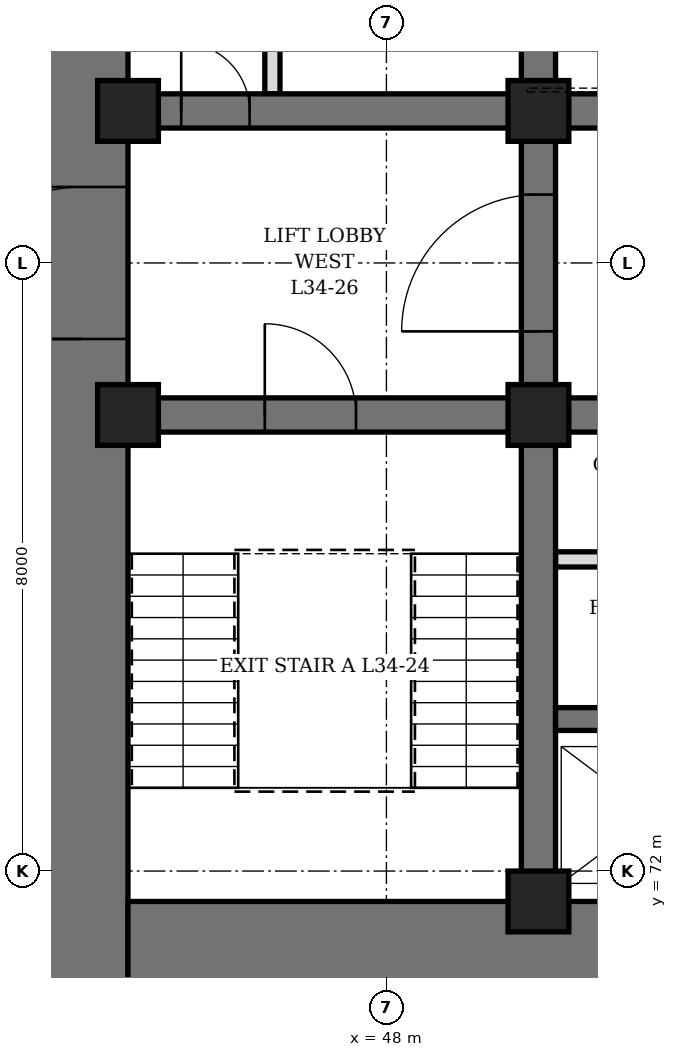
"""IFC4 building model, lengths in metres.
Left out: names, types, materials, properties, quantities, classifications, styles, units other than length and angle.
Written with IfcOpenShell. Run it as: python <this file> out.ifc"""

import sys

from ifc_helpers import new_model, si_unit, direction, frame, frame_2d, origin, origin_2d, place, context, subcontext, project, spatial, rectangle, hollow_rectangle, extrude, element, fill, save


model = new_model("IFC4")
c1 = context("Model", 3, precision=1e-05, world=origin(), true_north=direction((0.0, 1.0)))
c2 = subcontext(c1, "Body", "Model", "MODEL_VIEW")
j1 = project(units=[si_unit("LENGTHUNIT", "METRE"), si_unit("PLANEANGLEUNIT", "RADIAN")], contexts=[c1])
p1 = place(None, origin())
s1 = spatial("IfcSite", under=j1, at=p1, CompositionType="ELEMENT")
p2 = place(p1, origin())
s2 = spatial("IfcBuilding", under=s1, at=p2, CompositionType="ELEMENT")
p3 = place(p2, frame((0.0, 0.0, 154.3)))
s3 = spatial("IfcBuildingStorey", under=s2, at=p3, CompositionType="ELEMENT", Elevation=154.3)
p4 = place(p3, frame((44.0, 70.4, 0.0), z_axis=(0.0, 0.0, 1.0), x_axis=(0.0, 1.0, 0.0)))
e1 = element("IfcWall", 1, at=p4, inside=s3, PredefinedType="SHEAR", context=c2, shape_type="SweptSolid", body=[
    extrude(rectangle(XDim=19.2, YDim=1.2, at=frame_2d((9.6, 0.0))), origin(), (0.0, 0.0, 1.0), 4.2),
])
p5 = place(p4, frame((8.6, 0.0, 0.0)))
e2 = element("IfcOpeningElement", 2, at=p5, cuts=e1, PredefinedType="OPENING", context=c2, shape_type="SweptSolid", body=[
    extrude(rectangle(XDim=2.0, YDim=2.4, at=frame_2d((1.0, 1.2))), frame((0.0, 0.61, 0.0), z_axis=(0.0, -1.0, 0.0), x_axis=(1.0, 0.0, 0.0)), (0.0, 0.0, 1.0), 1.22),
])
p6 = place(p3, frame((44.6, 71.0, 0.0), z_axis=(0.0, 0.0, 1.0), x_axis=(1.0, 0.0, 0.0)))
e3 = element("IfcWall", 3, at=p6, inside=s3, PredefinedType="SHEAR", context=c2, shape_type="SweptSolid", body=[
    extrude(rectangle(XDim=22.8, YDim=1.2, at=frame_2d((11.4, 0.0))), origin(), (0.0, 0.0, 1.0), 4.2),
])
p7 = place(p3, frame((50.0, 71.6, 0.0), z_axis=(0.0, 0.0, 1.0), x_axis=(0.0, 1.0, 0.0)))
e4 = element("IfcWall", 4, at=p7, inside=s3, PredefinedType="SHEAR", context=c2, shape_type="SweptSolid", body=[
    extrude(rectangle(XDim=16.8, YDim=0.45, at=frame_2d((8.4, 0.0))), origin(), (0.0, 0.0, 1.0), 4.2),
])
p8 = place(p7, frame((7.5, 0.0, 0.0)))
e5 = element("IfcOpeningElement", 5, at=p8, cuts=e4, PredefinedType="OPENING", context=c2, shape_type="SweptSolid", body=[
    extrude(rectangle(XDim=1.8, YDim=2.4, at=frame_2d((0.9, 1.2))), frame((0.0, 0.235, 0.0), z_axis=(0.0, -1.0, 0.0), x_axis=(1.0, 0.0, 0.0)), (0.0, 0.0, 1.0), 0.47),
])
p9 = place(p3, frame((44.6, 78.0, 0.0), z_axis=(0.0, 0.0, 1.0), x_axis=(1.0, 0.0, 0.0)))
e6 = element("IfcWall", 6, at=p9, inside=s3, PredefinedType="SHEAR", context=c2, shape_type="SweptSolid", body=[
    extrude(rectangle(XDim=5.175, YDim=0.45, at=frame_2d((2.587, 0.0))), origin(), (0.0, 0.0, 1.0), 4.2),
])
p10 = place(p9, frame((1.8, 0.0, 0.0)))
e7 = element("IfcOpeningElement", 7, at=p10, cuts=e6, PredefinedType="OPENING", context=c2, shape_type="SweptSolid", body=[
    extrude(rectangle(XDim=1.2, YDim=2.1, at=frame_2d((0.6, 1.05))), frame((0.0, 0.235, 0.0), z_axis=(0.0, -1.0, 0.0), x_axis=(1.0, 0.0, 0.0)), (0.0, 0.0, 1.0), 0.47),
])
p11 = place(p3, frame((44.6, 82.0, 0.0), z_axis=(0.0, 0.0, 1.0), x_axis=(1.0, 0.0, 0.0)))
e8 = element("IfcWall", 8, at=p11, inside=s3, PredefinedType="SHEAR", context=c2, shape_type="SweptSolid", body=[
    extrude(rectangle(XDim=5.175, YDim=0.45, at=frame_2d((2.587, 0.0))), origin(), (0.0, 0.0, 1.0), 4.2),
])
p12 = place(p11, frame((0.7, 0.0, 0.0)))
e9 = element("IfcOpeningElement", 9, at=p12, cuts=e8, PredefinedType="OPENING", context=c2, shape_type="SweptSolid", body=[
    extrude(rectangle(XDim=0.9, YDim=2.1, at=frame_2d((0.45, 1.05))), frame((0.0, 0.235, 0.0), z_axis=(0.0, -1.0, 0.0), x_axis=(1.0, 0.0, 0.0)), (0.0, 0.0, 1.0), 0.47),
])
p13 = place(p3, frame((50.225, 78.0, 0.0), z_axis=(0.0, 0.0, 1.0), x_axis=(1.0, 0.0, 0.0)))
e10 = element("IfcWall", 10, at=p13, inside=s3, PredefinedType="SHEAR", context=c2, shape_type="SweptSolid", body=[
    extrude(rectangle(XDim=11.55, YDim=0.45, at=frame_2d((5.775, 0.0))), origin(), (0.0, 0.0, 1.0), 4.2),
])
p14 = place(p13, frame((0.825, 0.0, 0.0)))
e11 = element("IfcOpeningElement", 11, at=p14, cuts=e10, PredefinedType="OPENING", context=c2, shape_type="SweptSolid", body=[
    extrude(rectangle(XDim=0.9, YDim=2.1, at=frame_2d((0.45, 1.05))), frame((0.0, 0.235, 0.0), z_axis=(0.0, -1.0, 0.0), x_axis=(1.0, 0.0, 0.0)), (0.0, 0.0, 1.0), 0.47),
])
p15 = place(p13, frame((3.825, 0.0, 0.0)))
e12 = element("IfcOpeningElement", 12, at=p15, cuts=e10, PredefinedType="OPENING", context=c2, shape_type="SweptSolid", body=[
    extrude(rectangle(XDim=0.9, YDim=2.1, at=frame_2d((0.45, 1.05))), frame((0.0, 0.235, 0.0), z_axis=(0.0, -1.0, 0.0), x_axis=(1.0, 0.0, 0.0)), (0.0, 0.0, 1.0), 0.47),
])
p16 = place(p13, frame((6.825, 0.0, 0.0)))
e13 = element("IfcOpeningElement", 13, at=p16, cuts=e10, PredefinedType="OPENING", context=c2, shape_type="SweptSolid", body=[
    extrude(rectangle(XDim=0.9, YDim=2.1, at=frame_2d((0.45, 1.05))), frame((0.0, 0.235, 0.0), z_axis=(0.0, -1.0, 0.0), x_axis=(1.0, 0.0, 0.0)), (0.0, 0.0, 1.0), 0.47),
])
p17 = place(p13, frame((9.825, 0.0, 0.0)))
e14 = element("IfcOpeningElement", 14, at=p17, cuts=e10, PredefinedType="OPENING", context=c2, shape_type="SweptSolid", body=[
    extrude(rectangle(XDim=0.9, YDim=2.1, at=frame_2d((0.45, 1.05))), frame((0.0, 0.235, 0.0), z_axis=(0.0, -1.0, 0.0), x_axis=(1.0, 0.0, 0.0)), (0.0, 0.0, 1.0), 0.47),
])
p18 = place(p3, frame((50.225, 82.0, 0.0), z_axis=(0.0, 0.0, 1.0), x_axis=(1.0, 0.0, 0.0)))
e15 = element("IfcWall", 15, at=p18, inside=s3, PredefinedType="SHEAR", context=c2, shape_type="SweptSolid", body=[
    extrude(rectangle(XDim=11.55, YDim=0.45, at=frame_2d((5.775, 0.0))), origin(), (0.0, 0.0, 1.0), 4.2),
])
p19 = place(p18, frame((0.725, 0.0, 0.0)))
e16 = element("IfcOpeningElement", 16, at=p19, cuts=e15, PredefinedType="OPENING", context=c2, shape_type="SweptSolid", body=[
    extrude(rectangle(XDim=1.1, YDim=2.2, at=frame_2d((0.55, 1.1))), frame((0.0, 0.235, 0.0), z_axis=(0.0, -1.0, 0.0), x_axis=(1.0, 0.0, 0.0)), (0.0, 0.0, 1.0), 0.47),
])
p20 = place(p18, frame((3.725, 0.0, 0.0)))
e17 = element("IfcOpeningElement", 17, at=p20, cuts=e15, PredefinedType="OPENING", context=c2, shape_type="SweptSolid", body=[
    extrude(rectangle(XDim=1.1, YDim=2.2, at=frame_2d((0.55, 1.1))), frame((0.0, 0.235, 0.0), z_axis=(0.0, -1.0, 0.0), x_axis=(1.0, 0.0, 0.0)), (0.0, 0.0, 1.0), 0.47),
])
p21 = place(p18, frame((6.725, 0.0, 0.0)))
e18 = element("IfcOpeningElement", 18, at=p21, cuts=e15, PredefinedType="OPENING", context=c2, shape_type="SweptSolid", body=[
    extrude(rectangle(XDim=1.1, YDim=2.2, at=frame_2d((0.55, 1.1))), frame((0.0, 0.235, 0.0), z_axis=(0.0, -1.0, 0.0), x_axis=(1.0, 0.0, 0.0)), (0.0, 0.0, 1.0), 0.47),
])
p22 = place(p18, frame((9.725, 0.0, 0.0)))
e19 = element("IfcOpeningElement", 19, at=p22, cuts=e15, PredefinedType="OPENING", context=c2, shape_type="SweptSolid", body=[
    extrude(rectangle(XDim=1.1, YDim=2.2, at=frame_2d((0.55, 1.1))), frame((0.0, 0.235, 0.0), z_axis=(0.0, -1.0, 0.0), x_axis=(1.0, 0.0, 0.0)), (0.0, 0.0, 1.0), 0.47),
])
p23 = place(p3, frame((50.225, 74.0, 0.0), z_axis=(0.0, 0.0, 1.0), x_axis=(1.0, 0.0, 0.0)))
e20 = element("IfcWall", 20, at=p23, inside=s3, PredefinedType="SHEAR", context=c2, shape_type="SweptSolid", body=[
    extrude(rectangle(XDim=11.55, YDim=0.3, at=frame_2d((5.775, 0.0))), origin(), (0.0, 0.0, 1.0), 4.2),
])
for number, where, z_axis, x_axis in (
    (21, (44.6, 78.0, 0.0), (0.0, 0.0, 1.0), (1.0, 0.0, 0.0)),
    (22, (44.6, 82.0, 0.0), (0.0, 0.0, 1.0), (1.0, 0.0, 0.0)),
    (23, (50.0, 71.6, 0.0), (0.0, 0.0, 1.0), (1.0, 0.0, 0.0)),
    (24, (50.0, 78.0, 0.0), (0.0, 0.0, 1.0), (1.0, 0.0, 0.0)),
    (25, (50.0, 82.0, 0.0), (0.0, 0.0, 1.0), (1.0, 0.0, 0.0)),
):
    element("IfcColumn", number, at=place(p3, frame(where, z_axis=z_axis, x_axis=x_axis)), inside=s3, PredefinedType="COLUMN", context=c2, shape_type="SweptSolid", body=[
        extrude(hollow_rectangle(XDim=0.8, YDim=0.8, WallThickness=0.1, at=origin_2d()), origin(), (0.0, 0.0, 1.0), 4.2),
    ])
p24 = place(p3, frame((46.5, 82.225, 0.0), z_axis=(0.0, 0.0, 1.0), x_axis=(0.0, 1.0, 0.0)))
e26 = element("IfcWall", 26, at=p24, inside=s3, PredefinedType="PARTITIONING", context=c2, shape_type="SweptSolid", body=[
    extrude(rectangle(XDim=3.05, YDim=0.2, at=frame_2d((1.525, 0.0))), origin(), (0.0, 0.0, 1.0), 4.04),
])
p25 = place(p24, frame((1.075, 0.0, 0.0)))
e27 = element("IfcOpeningElement", 27, at=p25, cuts=e26, PredefinedType="OPENING", context=c2, shape_type="SweptSolid", body=[
    extrude(rectangle(XDim=0.9, YDim=2.1, at=frame_2d((0.45, 1.05))), frame((0.0, 0.11, 0.0), z_axis=(0.0, -1.0, 0.0), x_axis=(1.0, 0.0, 0.0)), (0.0, 0.0, 1.0), 0.22),
])
p26 = place(p3, frame((50.225, 76.1, 0.0), z_axis=(0.0, 0.0, 1.0), x_axis=(1.0, 0.0, 0.0)))
e28 = element("IfcWall", 28, at=p26, inside=s3, PredefinedType="PARTITIONING", context=c2, shape_type="SweptSolid", body=[
    extrude(rectangle(XDim=2.55, YDim=0.2, at=frame_2d((1.275, 0.0))), origin(), (0.0, 0.0, 1.0), 4.04),
])
p27 = place(p26, frame((0.825, 0.0, 0.0)))
e29 = element("IfcOpeningElement", 29, at=p27, cuts=e28, PredefinedType="OPENING", context=c2, shape_type="SweptSolid", body=[
    extrude(rectangle(XDim=0.9, YDim=2.1, at=frame_2d((0.45, 1.05))), frame((0.0, 0.11, 0.0), z_axis=(0.0, -1.0, 0.0), x_axis=(1.0, 0.0, 0.0)), (0.0, 0.0, 1.0), 0.22),
])
p28 = place(p12, origin())
e30 = element("IfcDoor", 30, at=p28, inside=s3, OperationType="SINGLE_SWING_LEFT", PredefinedType="DOOR", context=c2, shape_type="SweptSolid", body=[
    extrude(rectangle(XDim=0.9, YDim=2.1, at=frame_2d((0.45, 1.05))), frame((0.0, 0.225, 0.0), z_axis=(0.0, -1.0, 0.0), x_axis=(1.0, 0.0, 0.0)), (0.0, 0.0, 1.0), 0.449),
])
fill(e9, e30)
p29 = place(p10, origin())
e31 = element("IfcDoor", 31, at=p29, inside=s3, OperationType="SINGLE_SWING_LEFT", PredefinedType="DOOR", context=c2, shape_type="SweptSolid", body=[
    extrude(rectangle(XDim=1.2, YDim=2.1, at=frame_2d((0.6, 1.05))), frame((0.0, 0.225, 0.0), z_axis=(0.0, -1.0, 0.0), x_axis=(1.0, 0.0, 0.0)), (0.0, 0.0, 1.0), 0.449),
])
fill(e7, e31)
p30 = place(p5, origin())
e32 = element("IfcDoor", 32, at=p30, inside=s3, OperationType="DOUBLE_DOOR_SINGLE_SWING", PredefinedType="DOOR", context=c2, shape_type="SweptSolid", body=[
    extrude(rectangle(XDim=2.0, YDim=2.4, at=frame_2d((1.0, 1.2))), frame((0.0, 0.35, 0.0), z_axis=(0.0, -1.0, 0.0), x_axis=(1.0, 0.0, 0.0)), (0.0, 0.0, 1.0), 0.7),
])
fill(e2, e32)
p31 = place(p8, origin())
e33 = element("IfcDoor", 33, at=p31, inside=s3, OperationType="DOUBLE_DOOR_SINGLE_SWING", PredefinedType="DOOR", context=c2, shape_type="SweptSolid", body=[
    extrude(rectangle(XDim=1.8, YDim=2.4, at=frame_2d((0.9, 1.2))), frame((0.0, 0.225, 0.0), z_axis=(0.0, -1.0, 0.0), x_axis=(1.0, 0.0, 0.0)), (0.0, 0.0, 1.0), 0.449),
])
fill(e5, e33)
save(model, sys.argv[1])
